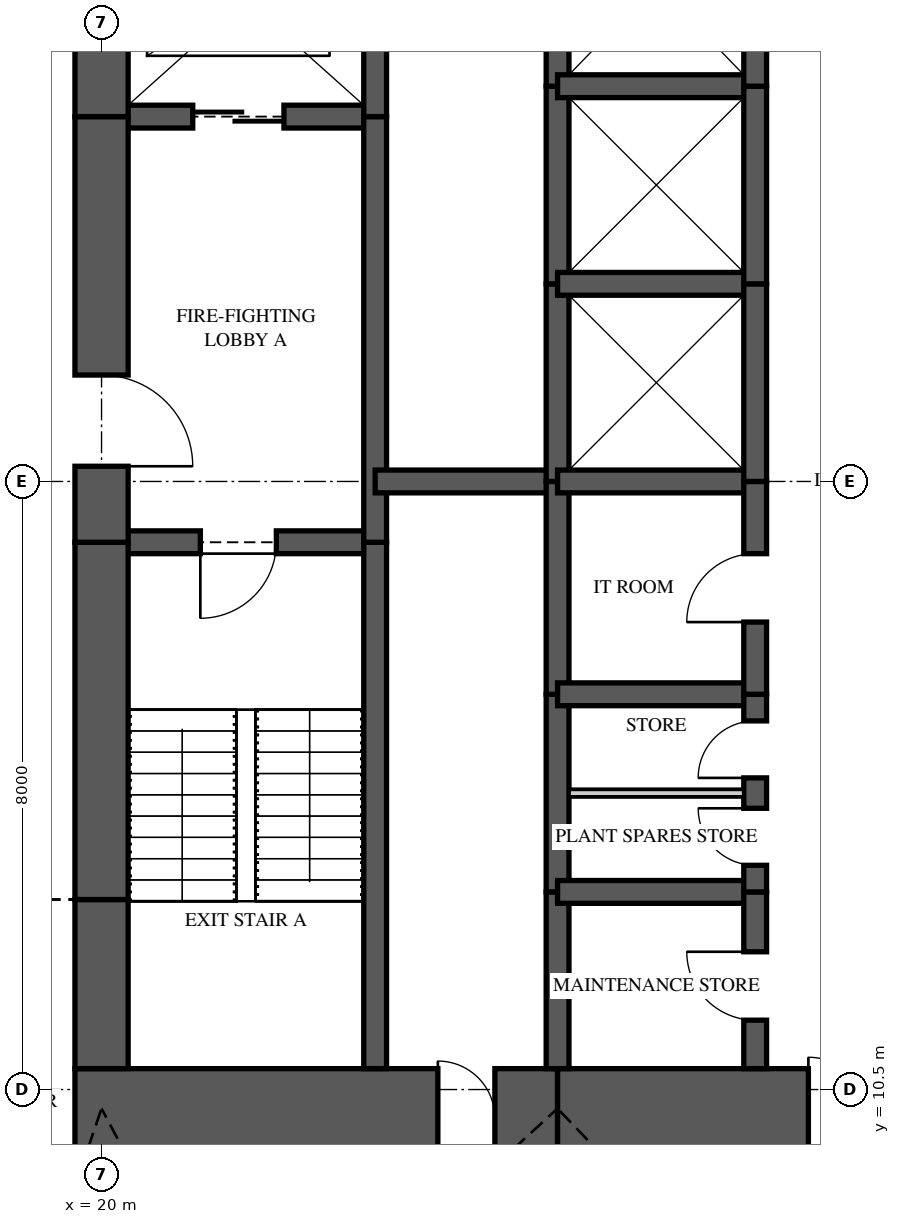
"""IFC4 building model, lengths in metres.
Left out: names, types, materials, properties, quantities, classifications, styles, units other than length and angle.
Written with IfcOpenShell. Run it as: python <this file> out.ifc"""

import sys

from ifc_helpers import new_model, si_unit, direction, frame, frame_2d, origin, place, context, subcontext, project, spatial, rectangle, extrude, element, fill, save


model = new_model("IFC4")
c1 = context("Model", 3, precision=1e-05, world=origin(), true_north=direction((0.0, 1.0)))
c2 = subcontext(c1, "Body", "Model", "MODEL_VIEW")
j1 = project(units=[si_unit("LENGTHUNIT", "METRE"), si_unit("PLANEANGLEUNIT", "RADIAN")], contexts=[c1])
p1 = place(None, origin())
s1 = spatial("IfcSite", under=j1, at=p1, CompositionType="ELEMENT")
p2 = place(p1, origin())
s2 = spatial("IfcBuilding", under=s1, at=p2, CompositionType="ELEMENT")
p3 = place(p2, frame((0.0, 0.0, 207.95)))
s3 = spatial("IfcBuildingStorey", under=s2, at=p3, CompositionType="ELEMENT", Elevation=207.95)
p4 = place(p3, frame((19.65, 10.125, 0.0), z_axis=(0.0, 0.0, 1.0), x_axis=(1.0, 0.0, 0.0)))
e1 = element("IfcWall", 1, at=p4, inside=s3, PredefinedType="SHEAR", context=c2, shape_type="SweptSolid", body=[
    extrude(rectangle(XDim=6.35, YDim=1.3, at=frame_2d((3.175, 0.0))), origin(), (0.0, 0.0, 1.0), 5.0),
])
p5 = place(p4, frame((4.775, 0.0, 0.0)))
e2 = element("IfcOpeningElement", 2, at=p5, cuts=e1, PredefinedType="OPENING", context=c2, shape_type="SweptSolid", body=[
    extrude(rectangle(XDim=0.75, YDim=2.1, at=frame_2d((0.375, 1.05))), frame((0.0, 0.66, 0.0), z_axis=(0.0, -1.0, 0.0), x_axis=(1.0, 0.0, 0.0)), (0.0, 0.0, 1.0), 1.32),
])
p6 = place(p3, frame((26.0, 10.125, 0.0), z_axis=(0.0, 0.0, 1.0), x_axis=(1.0, 0.0, 0.0)))
e3 = element("IfcWall", 3, at=p6, inside=s3, PredefinedType="SHEAR", context=c2, shape_type="SweptSolid", body=[
    extrude(rectangle(XDim=5.6, YDim=1.3, at=frame_2d((2.8, 0.0))), origin(), (0.0, 0.0, 1.0), 5.0),
])
p7 = place(p6, frame((3.3, 0.0, 0.0)))
e4 = element("IfcOpeningElement", 4, at=p7, cuts=e3, PredefinedType="OPENING", context=c2, shape_type="SweptSolid", body=[
    extrude(rectangle(XDim=1.6, YDim=2.1, at=frame_2d((0.8, 1.05))), frame((0.0, 0.66, 0.0), z_axis=(0.0, -1.0, 0.0), x_axis=(1.0, 0.0, 0.0)), (0.0, 0.0, 1.0), 1.32),
])
p8 = place(p3, frame((20.0, 26.225, 0.0), z_axis=(0.0, 0.0, 1.0), x_axis=(0.0, -1.0, 0.0)))
e5 = element("IfcWall", 5, at=p8, inside=s3, PredefinedType="SHEAR", context=c2, shape_type="SweptSolid", body=[
    extrude(rectangle(XDim=2.925, YDim=0.7, at=frame_2d((1.462, 0.0))), origin(), (0.0, 0.0, 1.0), 5.0),
])
p9 = place(p3, frame((20.0, 23.3, 0.0), z_axis=(0.0, 0.0, 1.0), x_axis=(0.0, -1.0, 0.0)))
e6 = element("IfcWall", 6, at=p9, inside=s3, PredefinedType="SHEAR", context=c2, shape_type="SweptSolid", body=[
    extrude(rectangle(XDim=5.6, YDim=0.7, at=frame_2d((2.8, 0.0))), origin(), (0.0, 0.0, 1.0), 5.0),
])
p10 = place(p9, frame((3.4, 0.0, 0.0)))
e7 = element("IfcOpeningElement", 7, at=p10, cuts=e6, PredefinedType="OPENING", context=c2, shape_type="SweptSolid", body=[
    extrude(rectangle(XDim=1.2, YDim=2.2, at=frame_2d((0.6, 1.1))), frame((0.0, 0.36, 0.0), z_axis=(0.0, -1.0, 0.0), x_axis=(1.0, 0.0, 0.0)), (0.0, 0.0, 1.0), 0.72),
])
p11 = place(p3, frame((20.0, 17.7, 0.0), z_axis=(0.0, 0.0, 1.0), x_axis=(0.0, -1.0, 0.0)))
e8 = element("IfcWall", 8, at=p11, inside=s3, PredefinedType="SHEAR", context=c2, shape_type="SweptSolid", body=[
    extrude(rectangle(XDim=4.7, YDim=0.7, at=frame_2d((2.35, 0.0))), origin(), (0.0, 0.0, 1.0), 5.0),
])
p12 = place(p3, frame((20.0, 13.0, 0.0), z_axis=(0.0, 0.0, 1.0), x_axis=(0.0, -1.0, 0.0)))
e9 = element("IfcWall", 9, at=p12, inside=s3, PredefinedType="SHEAR", context=c2, shape_type="SweptSolid", body=[
    extrude(rectangle(XDim=2.225, YDim=0.7, at=frame_2d((1.113, 0.0))), origin(), (0.0, 0.0, 1.0), 5.0),
])
p13 = place(p3, frame((23.6, 10.775, 0.0), z_axis=(0.0, 0.0, 1.0), x_axis=(0.0, 1.0, 0.0)))
e10 = element("IfcWall", 10, at=p13, inside=s3, PredefinedType="SHEAR", context=c2, shape_type="SweptSolid", body=[
    extrude(rectangle(XDim=6.925, YDim=0.3, at=frame_2d((3.462, 0.0))), origin(), (0.0, 0.0, 1.0), 5.0),
])
p14 = place(p3, frame((23.6, 17.7, 0.0), z_axis=(0.0, 0.0, 1.0), x_axis=(0.0, 1.0, 0.0)))
e11 = element("IfcWall", 11, at=p14, inside=s3, PredefinedType="SHEAR", context=c2, shape_type="SweptSolid", body=[
    extrude(rectangle(XDim=5.6, YDim=0.3, at=frame_2d((2.8, 0.0))), origin(), (0.0, 0.0, 1.0), 5.0),
])
p15 = place(p3, frame((23.6, 23.3, 0.0), z_axis=(0.0, 0.0, 1.0), x_axis=(0.0, 1.0, 0.0)))
e12 = element("IfcWall", 12, at=p15, inside=s3, PredefinedType="SHEAR", context=c2, shape_type="SweptSolid", body=[
    extrude(rectangle(XDim=2.925, YDim=0.3, at=frame_2d((1.462, 0.0))), origin(), (0.0, 0.0, 1.0), 5.0),
])
p16 = place(p3, frame((26.0, 10.775, 0.0), z_axis=(0.0, 0.0, 1.0), x_axis=(0.0, 1.0, 0.0)))
e13 = element("IfcWall", 13, at=p16, inside=s3, PredefinedType="SHEAR", context=c2, shape_type="SweptSolid", body=[
    extrude(rectangle(XDim=2.325, YDim=0.3, at=frame_2d((1.163, 0.0))), origin(), (0.0, 0.0, 1.0), 5.0),
])
p17 = place(p3, frame((26.0, 13.1, 0.0), z_axis=(0.0, 0.0, 1.0), x_axis=(0.0, 1.0, 0.0)))
e14 = element("IfcWall", 14, at=p17, inside=s3, PredefinedType="SHEAR", context=c2, shape_type="SweptSolid", body=[
    extrude(rectangle(XDim=2.6, YDim=0.3, at=frame_2d((1.3, 0.0))), origin(), (0.0, 0.0, 1.0), 5.0),
])
p18 = place(p3, frame((26.0, 15.7, 0.0), z_axis=(0.0, 0.0, 1.0), x_axis=(0.0, 1.0, 0.0)))
e15 = element("IfcWall", 15, at=p18, inside=s3, PredefinedType="SHEAR", context=c2, shape_type="SweptSolid", body=[
    extrude(rectangle(XDim=2.8, YDim=0.3, at=frame_2d((1.4, 0.0))), origin(), (0.0, 0.0, 1.0), 5.0),
])
p19 = place(p3, frame((26.0, 18.5, 0.0), z_axis=(0.0, 0.0, 1.0), x_axis=(0.0, 1.0, 0.0)))
e16 = element("IfcWall", 16, at=p19, inside=s3, PredefinedType="SHEAR", context=c2, shape_type="SweptSolid", body=[
    extrude(rectangle(XDim=2.6, YDim=0.3, at=frame_2d((1.3, 0.0))), origin(), (0.0, 0.0, 1.0), 5.0),
])
p20 = place(p3, frame((26.0, 21.1, 0.0), z_axis=(0.0, 0.0, 1.0), x_axis=(0.0, 1.0, 0.0)))
e17 = element("IfcWall", 17, at=p20, inside=s3, PredefinedType="SHEAR", context=c2, shape_type="SweptSolid", body=[
    extrude(rectangle(XDim=2.6, YDim=0.3, at=frame_2d((1.3, 0.0))), origin(), (0.0, 0.0, 1.0), 5.0),
])
p21 = place(p3, frame((26.0, 23.7, 0.0), z_axis=(0.0, 0.0, 1.0), x_axis=(0.0, 1.0, 0.0)))
e18 = element("IfcWall", 18, at=p21, inside=s3, PredefinedType="SHEAR", context=c2, shape_type="SweptSolid", body=[
    extrude(rectangle(XDim=2.525, YDim=0.3, at=frame_2d((1.263, 0.0))), origin(), (0.0, 0.0, 1.0), 5.0),
])
p22 = place(p3, frame((28.6, 10.775, 0.0), z_axis=(0.0, 0.0, 1.0), x_axis=(0.0, 1.0, 0.0)))
e19 = element("IfcWall", 19, at=p22, inside=s3, PredefinedType="SHEAR", context=c2, shape_type="SweptSolid", body=[
    extrude(rectangle(XDim=2.325, YDim=0.3, at=frame_2d((1.163, 0.0))), origin(), (0.0, 0.0, 1.0), 5.0),
])
p23 = place(p22, frame((0.637, 0.0, 0.0)))
e20 = element("IfcOpeningElement", 20, at=p23, cuts=e19, PredefinedType="OPENING", context=c2, shape_type="SweptSolid", body=[
    extrude(rectangle(XDim=0.9, YDim=2.1, at=frame_2d((0.45, 1.05))), frame((0.0, 0.16, 0.0), z_axis=(0.0, -1.0, 0.0), x_axis=(1.0, 0.0, 0.0)), (0.0, 0.0, 1.0), 0.32),
])
p24 = place(p3, frame((28.6, 13.1, 0.0), z_axis=(0.0, 0.0, 1.0), x_axis=(0.0, 1.0, 0.0)))
e21 = element("IfcWall", 21, at=p24, inside=s3, PredefinedType="SHEAR", context=c2, shape_type="SweptSolid", body=[
    extrude(rectangle(XDim=2.6, YDim=0.3, at=frame_2d((1.3, 0.0))), origin(), (0.0, 0.0, 1.0), 5.0),
])
p25 = place(p24, frame((0.35, 0.0, 0.0)))
e22 = element("IfcOpeningElement", 22, at=p25, cuts=e21, PredefinedType="OPENING", context=c2, shape_type="SweptSolid", body=[
    extrude(rectangle(XDim=0.75, YDim=2.1, at=frame_2d((0.375, 1.05))), frame((0.0, 0.16, 0.0), z_axis=(0.0, -1.0, 0.0), x_axis=(1.0, 0.0, 0.0)), (0.0, 0.0, 1.0), 0.32),
])
p26 = place(p24, frame((1.5, 0.0, 0.0)))
e23 = element("IfcOpeningElement", 23, at=p26, cuts=e21, PredefinedType="OPENING", context=c2, shape_type="SweptSolid", body=[
    extrude(rectangle(XDim=0.75, YDim=2.1, at=frame_2d((0.375, 1.05))), frame((0.0, 0.16, 0.0), z_axis=(0.0, -1.0, 0.0), x_axis=(1.0, 0.0, 0.0)), (0.0, 0.0, 1.0), 0.32),
])
p27 = place(p3, frame((28.6, 15.7, 0.0), z_axis=(0.0, 0.0, 1.0), x_axis=(0.0, 1.0, 0.0)))
e24 = element("IfcWall", 24, at=p27, inside=s3, PredefinedType="SHEAR", context=c2, shape_type="SweptSolid", body=[
    extrude(rectangle(XDim=2.8, YDim=0.3, at=frame_2d((1.4, 0.0))), origin(), (0.0, 0.0, 1.0), 5.0),
])
p28 = place(p27, frame((0.95, 0.0, 0.0)))
e25 = element("IfcOpeningElement", 25, at=p28, cuts=e24, PredefinedType="OPENING", context=c2, shape_type="SweptSolid", body=[
    extrude(rectangle(XDim=0.9, YDim=2.1, at=frame_2d((0.45, 1.05))), frame((0.0, 0.16, 0.0), z_axis=(0.0, -1.0, 0.0), x_axis=(1.0, 0.0, 0.0)), (0.0, 0.0, 1.0), 0.32),
])
p29 = place(p3, frame((28.6, 18.5, 0.0), z_axis=(0.0, 0.0, 1.0), x_axis=(0.0, 1.0, 0.0)))
e26 = element("IfcWall", 26, at=p29, inside=s3, PredefinedType="SHEAR", context=c2, shape_type="SweptSolid", body=[
    extrude(rectangle(XDim=2.6, YDim=0.3, at=frame_2d((1.3, 0.0))), origin(), (0.0, 0.0, 1.0), 5.0),
])
p30 = place(p3, frame((28.6, 21.1, 0.0), z_axis=(0.0, 0.0, 1.0), x_axis=(0.0, 1.0, 0.0)))
e27 = element("IfcWall", 27, at=p30, inside=s3, PredefinedType="SHEAR", context=c2, shape_type="SweptSolid", body=[
    extrude(rectangle(XDim=2.6, YDim=0.3, at=frame_2d((1.3, 0.0))), origin(), (0.0, 0.0, 1.0), 5.0),
])
p31 = place(p3, frame((28.6, 23.7, 0.0), z_axis=(0.0, 0.0, 1.0), x_axis=(0.0, 1.0, 0.0)))
e28 = element("IfcWall", 28, at=p31, inside=s3, PredefinedType="SHEAR", context=c2, shape_type="SweptSolid", body=[
    extrude(rectangle(XDim=2.525, YDim=0.3, at=frame_2d((1.263, 0.0))), origin(), (0.0, 0.0, 1.0), 5.0),
])
p32 = place(p3, frame((20.0, 17.7, 0.0), z_axis=(0.0, 0.0, 1.0), x_axis=(1.0, 0.0, 0.0)))
e29 = element("IfcWall", 29, at=p32, inside=s3, PredefinedType="SHEAR", context=c2, shape_type="SweptSolid", body=[
    extrude(rectangle(XDim=3.6, YDim=0.3, at=frame_2d((1.8, 0.0))), origin(), (0.0, 0.0, 1.0), 5.0),
])
p33 = place(p32, frame((1.3, 0.0, 0.0)))
e30 = element("IfcOpeningElement", 30, at=p33, cuts=e29, PredefinedType="OPENING", context=c2, shape_type="SweptSolid", body=[
    extrude(rectangle(XDim=1.0, YDim=2.1, at=frame_2d((0.5, 1.05))), frame((0.0, 0.16, 0.0), z_axis=(0.0, -1.0, 0.0), x_axis=(1.0, 0.0, 0.0)), (0.0, 0.0, 1.0), 0.32),
])
p34 = place(p3, frame((20.0, 23.3, 0.0), z_axis=(0.0, 0.0, 1.0), x_axis=(1.0, 0.0, 0.0)))
e31 = element("IfcWall", 31, at=p34, inside=s3, PredefinedType="SHEAR", context=c2, shape_type="SweptSolid", body=[
    extrude(rectangle(XDim=3.6, YDim=0.3, at=frame_2d((1.8, 0.0))), origin(), (0.0, 0.0, 1.0), 5.0),
])
p35 = place(p34, frame((1.2, 0.0, 0.0)))
e32 = element("IfcOpeningElement", 32, at=p35, cuts=e31, PredefinedType="OPENING", context=c2, shape_type="SweptSolid", body=[
    extrude(rectangle(XDim=1.2, YDim=2.1, at=frame_2d((0.6, 1.05))), frame((0.0, 0.16, 0.0), z_axis=(0.0, -1.0, 0.0), x_axis=(1.0, 0.0, 0.0)), (0.0, 0.0, 1.0), 0.32),
])
p36 = place(p3, frame((23.6, 18.5, 0.0), z_axis=(0.0, 0.0, 1.0), x_axis=(1.0, 0.0, 0.0)))
e33 = element("IfcWall", 33, at=p36, inside=s3, PredefinedType="SHEAR", context=c2, shape_type="SweptSolid", body=[
    extrude(rectangle(XDim=2.4, YDim=0.3, at=frame_2d((1.2, 0.0))), origin(), (0.0, 0.0, 1.0), 5.0),
])
for number, where, z_axis, x_axis in (
    (34, (26.0, 13.1, 0.0), (0.0, 0.0, 1.0), (1.0, 0.0, 0.0)),
    (35, (26.0, 15.7, 0.0), (0.0, 0.0, 1.0), (1.0, 0.0, 0.0)),
    (36, (26.0, 18.5, 0.0), (0.0, 0.0, 1.0), (1.0, 0.0, 0.0)),
    (37, (26.0, 21.1, 0.0), (0.0, 0.0, 1.0), (1.0, 0.0, 0.0)),
    (38, (26.0, 23.7, 0.0), (0.0, 0.0, 1.0), (1.0, 0.0, 0.0)),
):
    element("IfcWall", number, at=place(p3, frame(where, z_axis=z_axis, x_axis=x_axis)), inside=s3, PredefinedType="SHEAR", context=c2, shape_type="SweptSolid", body=[
        extrude(rectangle(XDim=2.6, YDim=0.3, at=frame_2d((1.3, 0.0))), origin(), (0.0, 0.0, 1.0), 5.0),
    ])
p37 = place(p3, frame((26.15, 14.4, 0.0), z_axis=(0.0, 0.0, 1.0), x_axis=(1.0, 0.0, 0.0)))
e39 = element("IfcWall", 39, at=p37, inside=s3, PredefinedType="PARTITIONING", context=c2, shape_type="SweptSolid", body=[
    extrude(rectangle(XDim=2.3, YDim=0.1, at=frame_2d((1.15, 0.0))), origin(), (0.0, 0.0, 1.0), 4.72),
])
p38 = place(p33, frame((1.0, 0.0, 0.0), z_axis=(0.0, 0.0, 1.0), x_axis=(-1.0, 0.0, 0.0)))
e40 = element("IfcDoor", 40, at=p38, inside=s3, OperationType="SINGLE_SWING_RIGHT", PredefinedType="DOOR", context=c2, shape_type="SweptSolid", body=[
    extrude(rectangle(XDim=1.0, YDim=2.1, at=frame_2d((0.5, 1.05))), frame((0.0, 0.025, 0.0), z_axis=(0.0, -1.0, 0.0), x_axis=(1.0, 0.0, 0.0)), (0.0, 0.0, 1.0), 0.05),
])
fill(e30, e40)
p39 = place(p10, origin())
e41 = element("IfcDoor", 41, at=p39, inside=s3, OperationType="SINGLE_SWING_RIGHT", PredefinedType="DOOR", context=c2, shape_type="SweptSolid", body=[
    extrude(rectangle(XDim=1.2, YDim=2.2, at=frame_2d((0.6, 1.1))), frame((0.0, 0.025, 0.0), z_axis=(0.0, -1.0, 0.0), x_axis=(1.0, 0.0, 0.0)), (0.0, 0.0, 1.0), 0.05),
])
fill(e7, e41)
p40 = place(p35, origin())
e42 = element("IfcDoor", 42, at=p40, inside=s3, OperationType="SLIDING_TO_LEFT", PredefinedType="DOOR", context=c2, shape_type="SweptSolid", body=[
    extrude(rectangle(XDim=1.2, YDim=2.1, at=frame_2d((0.6, 1.05))), frame((0.0, 0.025, 0.0), z_axis=(0.0, -1.0, 0.0), x_axis=(1.0, 0.0, 0.0)), (0.0, 0.0, 1.0), 0.05),
])
fill(e32, e42)
p41 = place(p23, origin())
e43 = element("IfcDoor", 43, at=p41, inside=s3, OperationType="SINGLE_SWING_RIGHT", PredefinedType="DOOR", context=c2, shape_type="SweptSolid", body=[
    extrude(rectangle(XDim=0.9, YDim=2.1, at=frame_2d((0.45, 1.05))), frame((0.0, 0.025, 0.0), z_axis=(0.0, -1.0, 0.0), x_axis=(1.0, 0.0, 0.0)), (0.0, 0.0, 1.0), 0.05),
])
fill(e20, e43)
p42 = place(p25, origin())
e44 = element("IfcDoor", 44, at=p42, inside=s3, OperationType="SINGLE_SWING_RIGHT", PredefinedType="DOOR", context=c2, shape_type="SweptSolid", body=[
    extrude(rectangle(XDim=0.75, YDim=2.1, at=frame_2d((0.375, 1.05))), frame((0.0, 0.025, 0.0), z_axis=(0.0, -1.0, 0.0), x_axis=(1.0, 0.0, 0.0)), (0.0, 0.0, 1.0), 0.05),
])
fill(e22, e44)
p43 = place(p26, origin())
e45 = element("IfcDoor", 45, at=p43, inside=s3, OperationType="SINGLE_SWING_LEFT", PredefinedType="DOOR", context=c2, shape_type="SweptSolid", body=[
    extrude(rectangle(XDim=0.75, YDim=2.1, at=frame_2d((0.375, 1.05))), frame((0.0, 0.025, 0.0), z_axis=(0.0, -1.0, 0.0), x_axis=(1.0, 0.0, 0.0)), (0.0, 0.0, 1.0), 0.05),
])
fill(e23, e45)
p44 = place(p28, origin())
e46 = element("IfcDoor", 46, at=p44, inside=s3, OperationType="SINGLE_SWING_LEFT", PredefinedType="DOOR", context=c2, shape_type="SweptSolid", body=[
    extrude(rectangle(XDim=0.9, YDim=2.1, at=frame_2d((0.45, 1.05))), frame((0.0, 0.025, 0.0), z_axis=(0.0, -1.0, 0.0), x_axis=(1.0, 0.0, 0.0)), (0.0, 0.0, 1.0), 0.05),
])
fill(e25, e46)
p45 = place(p7, origin())
e47 = element("IfcDoor", 47, at=p45, inside=s3, OperationType="DOUBLE_DOOR_SINGLE_SWING", PredefinedType="DOOR", context=c2, shape_type="SweptSolid", body=[
    extrude(rectangle(XDim=1.6, YDim=2.1, at=frame_2d((0.8, 1.05))), frame((0.0, 0.025, 0.0), z_axis=(0.0, -1.0, 0.0), x_axis=(1.0, 0.0, 0.0)), (0.0, 0.0, 1.0), 0.05),
])
fill(e4, e47)
p46 = place(p5, origin())
e48 = element("IfcDoor", 48, at=p46, inside=s3, OperationType="SINGLE_SWING_LEFT", PredefinedType="DOOR", context=c2, shape_type="SweptSolid", body=[
    extrude(rectangle(XDim=0.75, YDim=2.1, at=frame_2d((0.375, 1.05))), frame((0.0, 0.025, 0.0), z_axis=(0.0, -1.0, 0.0), x_axis=(1.0, 0.0, 0.0)), (0.0, 0.0, 1.0), 0.05),
])
fill(e2, e48)
save(model, sys.argv[1])
